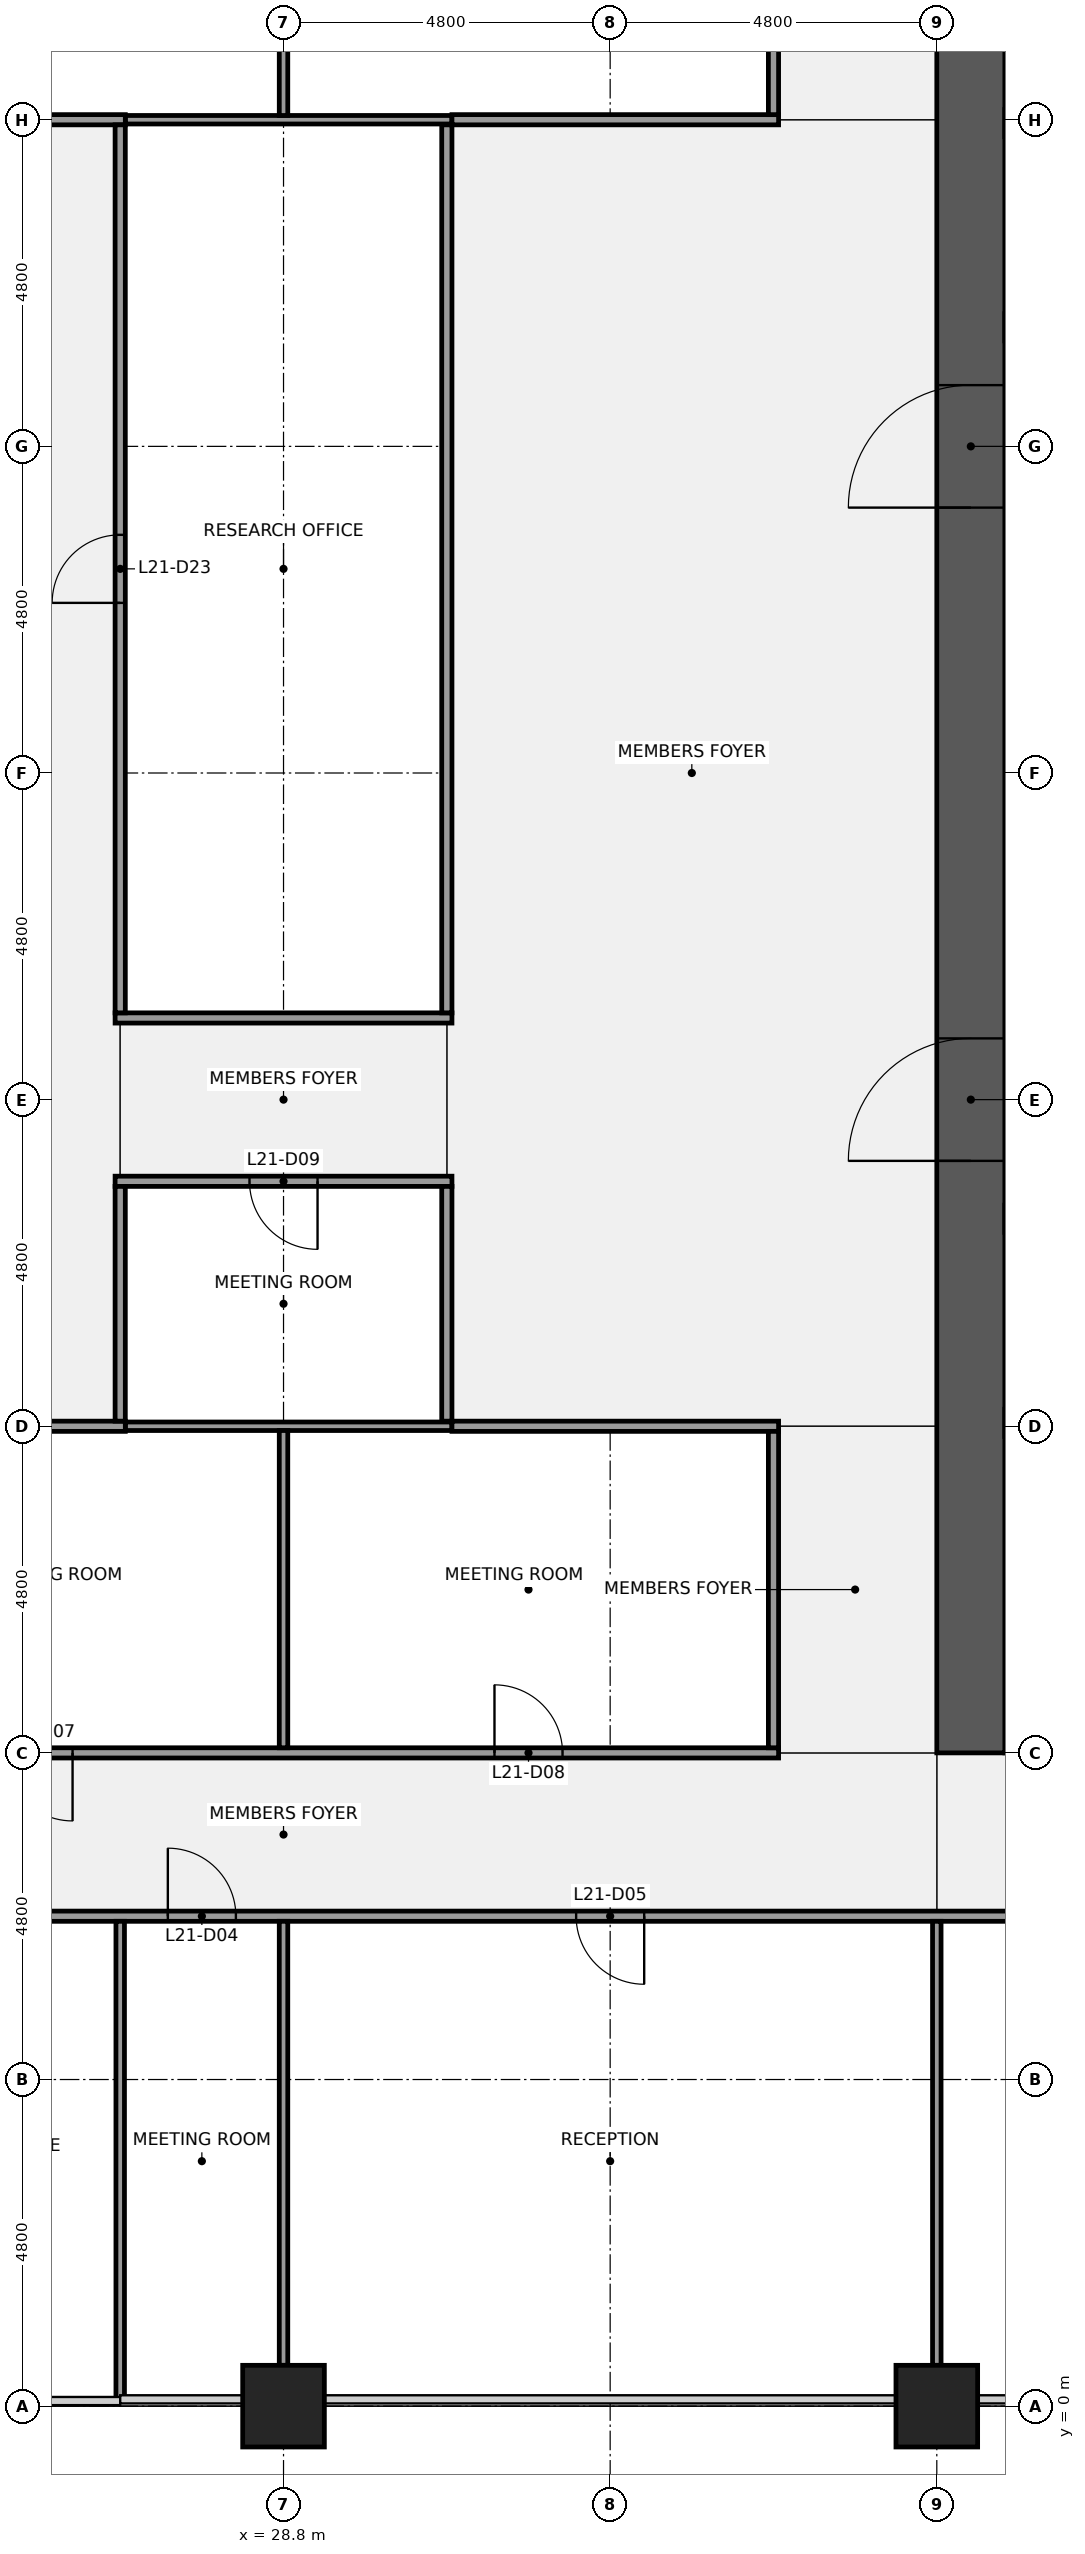
"""IFC4 building model, lengths in metres.
Left out: names, types, materials, properties, quantities, classifications, styles, units other than length and angle.
Written with IfcOpenShell. Run it as: python <this file> out.ifc"""

import sys

from ifc_helpers import new_model, si_unit, direction, frame, frame_2d, origin, origin_2d, place, context, subcontext, project, spatial, rectangle, extrude, element, fill, save


model = new_model("IFC4")
c1 = context("Model", 3, precision=1e-05, world=origin(), true_north=direction((0.0, 1.0)))
c2 = subcontext(c1, "Body", "Model", "MODEL_VIEW")
j1 = project(units=[si_unit("LENGTHUNIT", "METRE"), si_unit("PLANEANGLEUNIT", "RADIAN")], contexts=[c1])
p1 = place(None, origin())
s1 = spatial("IfcSite", under=j1, at=p1, CompositionType="ELEMENT")
p2 = place(p1, origin())
s2 = spatial("IfcBuilding", under=s1, at=p2, CompositionType="ELEMENT")
p3 = place(p2, frame((0.0, 0.0, 104.1)))
s3 = spatial("IfcBuildingStorey", under=s2, at=p3, CompositionType="ELEMENT", Elevation=104.1)
for number, where, z_axis, x_axis in (
    (1, (28.8, 0.0, 0.0), (0.0, 0.0, 1.0), (1.0, 0.0, 0.0)),
    (2, (38.4, 0.0, 0.0), (0.0, 0.0, 1.0), (1.0, 0.0, 0.0)),
):
    element("IfcColumn", number, at=place(p3, frame(where, z_axis=z_axis, x_axis=x_axis)), inside=s3, PredefinedType="COLUMN", context=c2, shape_type="SweptSolid", body=[
        extrude(rectangle(XDim=1.2, YDim=1.2, at=origin_2d()), origin(), (0.0, 0.0, 1.0), 4.0),
    ])
p4 = place(p3, frame((52.8, 10.1, 0.0), z_axis=(0.0, 0.0, 1.0), x_axis=(-1.0, 0.0, 0.0)))
e3 = element("IfcWall", 3, at=p4, inside=s3, PredefinedType="SHEAR", context=c2, shape_type="SweptSolid", body=[
    extrude(rectangle(XDim=13.4, YDim=1.0, at=frame_2d((6.7, 0.0))), origin(), (0.0, 0.0, 1.0), 3.84),
])
p5 = place(p4, frame((11.45, 0.0, 0.0)))
e4 = element("IfcOpeningElement", 4, at=p5, cuts=e3, PredefinedType="OPENING", context=c2, shape_type="SweptSolid", body=[
    extrude(rectangle(XDim=1.1, YDim=2.1, at=frame_2d((0.55, 1.05))), frame((0.0, 0.51, 0.0), z_axis=(0.0, -1.0, 0.0), x_axis=(1.0, 0.0, 0.0)), (0.0, 0.0, 1.0), 1.02),
])
p6 = place(p3, frame((38.9, 9.6, 0.0), z_axis=(0.0, 0.0, 1.0), x_axis=(0.0, 1.0, 0.0)))
e5 = element("IfcWall", 5, at=p6, inside=s3, PredefinedType="SHEAR", context=c2, shape_type="SweptSolid", body=[
    extrude(rectangle(XDim=28.8, YDim=1.0, at=frame_2d((14.4, 0.0))), origin(), (0.0, 0.0, 1.0), 3.84),
])
p7 = place(p6, frame((8.7, 0.0, 0.0)))
e6 = element("IfcOpeningElement", 6, at=p7, cuts=e5, PredefinedType="OPENING", context=c2, shape_type="SweptSolid", body=[
    extrude(rectangle(XDim=1.8, YDim=2.1, at=frame_2d((0.9, 1.05))), frame((0.0, 0.51, 0.0), z_axis=(0.0, -1.0, 0.0), x_axis=(1.0, 0.0, 0.0)), (0.0, 0.0, 1.0), 1.02),
])
p8 = place(p6, frame((18.3, 0.0, 0.0)))
e7 = element("IfcOpeningElement", 7, at=p8, cuts=e5, PredefinedType="OPENING", context=c2, shape_type="SweptSolid", body=[
    extrude(rectangle(XDim=1.8, YDim=2.1, at=frame_2d((0.9, 1.05))), frame((0.0, 0.51, 0.0), z_axis=(0.0, -1.0, 0.0), x_axis=(1.0, 0.0, 0.0)), (0.0, 0.0, 1.0), 1.02),
])
p9 = place(p3, frame((9.7, 7.2, 0.0), z_axis=(0.0, 0.0, 1.0), x_axis=(1.0, 0.0, 0.0)))
e8 = element("IfcWall", 8, at=p9, inside=s3, PredefinedType="PARTITIONING", context=c2, shape_type="SweptSolid", body=[
    extrude(rectangle(XDim=38.375, YDim=0.15, at=frame_2d((19.188, 0.0))), origin(), (0.0, 0.0, 1.0), 2.936),
])
p10 = place(p9, frame((4.25, 0.0, 0.0)))
e9 = element("IfcOpeningElement", 9, at=p10, cuts=e8, PredefinedType="OPENING", context=c2, shape_type="SweptSolid", body=[
    extrude(rectangle(XDim=1.0, YDim=2.1, at=frame_2d((0.5, 1.05))), frame((0.0, 0.085, 0.0), z_axis=(0.0, -1.0, 0.0), x_axis=(1.0, 0.0, 0.0)), (0.0, 0.0, 1.0), 0.17),
])
p11 = place(p9, frame((10.2, 0.0, 0.0)))
e10 = element("IfcOpeningElement", 10, at=p11, cuts=e8, PredefinedType="OPENING", context=c2, shape_type="SweptSolid", body=[
    extrude(rectangle(XDim=1.0, YDim=2.1, at=frame_2d((0.5, 1.05))), frame((0.0, 0.085, 0.0), z_axis=(0.0, -1.0, 0.0), x_axis=(1.0, 0.0, 0.0)), (0.0, 0.0, 1.0), 0.17),
])
p12 = place(p9, frame((13.8, 0.0, 0.0)))
e11 = element("IfcOpeningElement", 11, at=p12, cuts=e8, PredefinedType="OPENING", context=c2, shape_type="SweptSolid", body=[
    extrude(rectangle(XDim=1.0, YDim=2.1, at=frame_2d((0.5, 1.05))), frame((0.0, 0.085, 0.0), z_axis=(0.0, -1.0, 0.0), x_axis=(1.0, 0.0, 0.0)), (0.0, 0.0, 1.0), 0.17),
])
p13 = place(p9, frame((17.4, 0.0, 0.0)))
e12 = element("IfcOpeningElement", 12, at=p13, cuts=e8, PredefinedType="OPENING", context=c2, shape_type="SweptSolid", body=[
    extrude(rectangle(XDim=1.0, YDim=2.1, at=frame_2d((0.5, 1.05))), frame((0.0, 0.085, 0.0), z_axis=(0.0, -1.0, 0.0), x_axis=(1.0, 0.0, 0.0)), (0.0, 0.0, 1.0), 0.17),
])
p14 = place(p9, frame((23.4, 0.0, 0.0)))
e13 = element("IfcOpeningElement", 13, at=p14, cuts=e8, PredefinedType="OPENING", context=c2, shape_type="SweptSolid", body=[
    extrude(rectangle(XDim=1.0, YDim=2.1, at=frame_2d((0.5, 1.05))), frame((0.0, 0.085, 0.0), z_axis=(0.0, -1.0, 0.0), x_axis=(1.0, 0.0, 0.0)), (0.0, 0.0, 1.0), 0.17),
])
p15 = place(p9, frame((33.0, 0.0, 0.0)))
e14 = element("IfcOpeningElement", 14, at=p15, cuts=e8, PredefinedType="OPENING", context=c2, shape_type="SweptSolid", body=[
    extrude(rectangle(XDim=1.0, YDim=2.1, at=frame_2d((0.5, 1.05))), frame((0.0, 0.085, 0.0), z_axis=(0.0, -1.0, 0.0), x_axis=(1.0, 0.0, 0.0)), (0.0, 0.0, 1.0), 0.17),
])
p16 = place(p3, frame((21.525, 9.6, 0.0), z_axis=(0.0, 0.0, 1.0), x_axis=(1.0, 0.0, 0.0)))
e15 = element("IfcWall", 15, at=p16, inside=s3, PredefinedType="PARTITIONING", context=c2, shape_type="SweptSolid", body=[
    extrude(rectangle(XDim=14.55, YDim=0.15, at=frame_2d((7.275, 0.0))), origin(), (0.0, 0.0, 1.0), 2.936),
])
p17 = place(p16, frame((3.175, 0.0, 0.0)))
e16 = element("IfcOpeningElement", 16, at=p17, cuts=e15, PredefinedType="OPENING", context=c2, shape_type="SweptSolid", body=[
    extrude(rectangle(XDim=1.0, YDim=2.1, at=frame_2d((0.5, 1.05))), frame((0.0, 0.085, 0.0), z_axis=(0.0, -1.0, 0.0), x_axis=(1.0, 0.0, 0.0)), (0.0, 0.0, 1.0), 0.17),
])
p18 = place(p16, frame((10.375, 0.0, 0.0)))
e17 = element("IfcOpeningElement", 17, at=p18, cuts=e15, PredefinedType="OPENING", context=c2, shape_type="SweptSolid", body=[
    extrude(rectangle(XDim=1.0, YDim=2.1, at=frame_2d((0.5, 1.05))), frame((0.0, 0.085, 0.0), z_axis=(0.0, -1.0, 0.0), x_axis=(1.0, 0.0, 0.0)), (0.0, 0.0, 1.0), 0.17),
])
p19 = place(p3, frame((26.475, 14.4, 0.0), z_axis=(0.0, 0.0, 1.0), x_axis=(1.0, 0.0, 0.0)))
e18 = element("IfcWall", 18, at=p19, inside=s3, PredefinedType="PARTITIONING", context=c2, shape_type="SweptSolid", body=[
    extrude(rectangle(XDim=4.8, YDim=0.125, at=frame_2d((2.4, 0.0))), origin(), (0.0, 0.0, 1.0), 2.936),
])
p20 = place(p3, frame((21.525, 14.4, 0.0), z_axis=(0.0, 0.0, 1.0), x_axis=(1.0, 0.0, 0.0)))
e19 = element("IfcWall", 19, at=p20, inside=s3, PredefinedType="PARTITIONING", context=c2, shape_type="SweptSolid", body=[
    extrude(rectangle(XDim=4.95, YDim=0.15, at=frame_2d((2.475, 0.0))), origin(), (0.0, 0.0, 1.0), 2.936),
])
p21 = place(p3, frame((31.275, 14.4, 0.0), z_axis=(0.0, 0.0, 1.0), x_axis=(1.0, 0.0, 0.0)))
e20 = element("IfcWall", 20, at=p21, inside=s3, PredefinedType="PARTITIONING", context=c2, shape_type="SweptSolid", body=[
    extrude(rectangle(XDim=4.8, YDim=0.15, at=frame_2d((2.4, 0.0))), origin(), (0.0, 0.0, 1.0), 2.936),
])
p22 = place(p3, frame((26.325, 18.0, 0.0), z_axis=(0.0, 0.0, 1.0), x_axis=(1.0, 0.0, 0.0)))
e21 = element("IfcWall", 21, at=p22, inside=s3, PredefinedType="PARTITIONING", context=c2, shape_type="SweptSolid", body=[
    extrude(rectangle(XDim=4.95, YDim=0.15, at=frame_2d((2.475, 0.0))), origin(), (0.0, 0.0, 1.0), 2.936),
])
p23 = place(p22, frame((1.975, 0.0, 0.0)))
e22 = element("IfcOpeningElement", 22, at=p23, cuts=e21, PredefinedType="OPENING", context=c2, shape_type="SweptSolid", body=[
    extrude(rectangle(XDim=1.0, YDim=2.1, at=frame_2d((0.5, 1.05))), frame((0.0, 0.085, 0.0), z_axis=(0.0, -1.0, 0.0), x_axis=(1.0, 0.0, 0.0)), (0.0, 0.0, 1.0), 0.17),
])
p24 = place(p3, frame((26.325, 20.4, 0.0), z_axis=(0.0, 0.0, 1.0), x_axis=(1.0, 0.0, 0.0)))
e23 = element("IfcWall", 23, at=p24, inside=s3, PredefinedType="PARTITIONING", context=c2, shape_type="SweptSolid", body=[
    extrude(rectangle(XDim=4.95, YDim=0.15, at=frame_2d((2.475, 0.0))), origin(), (0.0, 0.0, 1.0), 2.936),
])
p25 = place(p3, frame((26.475, 33.6, 0.0), z_axis=(0.0, 0.0, 1.0), x_axis=(1.0, 0.0, 0.0)))
e24 = element("IfcWall", 24, at=p25, inside=s3, PredefinedType="PARTITIONING", context=c2, shape_type="SweptSolid", body=[
    extrude(rectangle(XDim=4.8, YDim=0.125, at=frame_2d((2.4, 0.0))), origin(), (0.0, 0.0, 1.0), 2.936),
])
p26 = place(p3, frame((21.525, 33.6, 0.0), z_axis=(0.0, 0.0, 1.0), x_axis=(1.0, 0.0, 0.0)))
e25 = element("IfcWall", 25, at=p26, inside=s3, PredefinedType="PARTITIONING", context=c2, shape_type="SweptSolid", body=[
    extrude(rectangle(XDim=4.95, YDim=0.15, at=frame_2d((2.475, 0.0))), origin(), (0.0, 0.0, 1.0), 2.936),
])
p27 = place(p3, frame((31.275, 33.6, 0.0), z_axis=(0.0, 0.0, 1.0), x_axis=(1.0, 0.0, 0.0)))
e26 = element("IfcWall", 26, at=p27, inside=s3, PredefinedType="PARTITIONING", context=c2, shape_type="SweptSolid", body=[
    extrude(rectangle(XDim=4.8, YDim=0.15, at=frame_2d((2.4, 0.0))), origin(), (0.0, 0.0, 1.0), 2.936),
])
p28 = place(p3, frame((26.4, 0.1, 0.0), z_axis=(0.0, 0.0, 1.0), x_axis=(0.0, 1.0, 0.0)))
e27 = element("IfcWall", 27, at=p28, inside=s3, PredefinedType="PARTITIONING", context=c2, shape_type="SweptSolid", body=[
    extrude(rectangle(XDim=7.025, YDim=0.125, at=frame_2d((3.512, 0.0))), origin(), (0.0, 0.0, 1.0), 2.936),
])
p29 = place(p3, frame((26.4, 14.475, 0.0), z_axis=(0.0, 0.0, 1.0), x_axis=(0.0, 1.0, 0.0)))
e28 = element("IfcWall", 28, at=p29, inside=s3, PredefinedType="PARTITIONING", context=c2, shape_type="SweptSolid", body=[
    extrude(rectangle(XDim=3.45, YDim=0.15, at=frame_2d((1.725, 0.0))), origin(), (0.0, 0.0, 1.0), 2.936),
])
p30 = place(p3, frame((26.4, 20.475, 0.0), z_axis=(0.0, 0.0, 1.0), x_axis=(0.0, 1.0, 0.0)))
e29 = element("IfcWall", 29, at=p30, inside=s3, PredefinedType="PARTITIONING", context=c2, shape_type="SweptSolid", body=[
    extrude(rectangle(XDim=13.05, YDim=0.15, at=frame_2d((6.525, 0.0))), origin(), (0.0, 0.0, 1.0), 2.936),
])
p31 = place(p30, frame((6.025, 0.0, 0.0)))
e30 = element("IfcOpeningElement", 30, at=p31, cuts=e29, PredefinedType="OPENING", context=c2, shape_type="SweptSolid", body=[
    extrude(rectangle(XDim=1.0, YDim=2.1, at=frame_2d((0.5, 1.05))), frame((0.0, 0.085, 0.0), z_axis=(0.0, -1.0, 0.0), x_axis=(1.0, 0.0, 0.0)), (0.0, 0.0, 1.0), 0.17),
])
p32 = place(p3, frame((28.8, 0.6, 0.0), z_axis=(0.0, 0.0, 1.0), x_axis=(0.0, 1.0, 0.0)))
e31 = element("IfcWall", 31, at=p32, inside=s3, PredefinedType="PARTITIONING", context=c2, shape_type="SweptSolid", body=[
    extrude(rectangle(XDim=6.525, YDim=0.125, at=frame_2d((3.262, 0.0))), origin(), (0.0, 0.0, 1.0), 2.936),
])
for number, where, z_axis, x_axis in (
    (32, (28.8, 9.675, 0.0), (0.0, 0.0, 1.0), (0.0, 1.0, 0.0)),
    (33, (28.8, 33.663, 0.0), (0.0, 0.0, 1.0), (0.0, 1.0, 0.0)),
):
    element("IfcWall", number, at=place(p3, frame(where, z_axis=z_axis, x_axis=x_axis)), inside=s3, PredefinedType="PARTITIONING", context=c2, shape_type="SweptSolid", body=[
        extrude(rectangle(XDim=4.662, YDim=0.125, at=frame_2d((2.331, 0.0))), origin(), (0.0, 0.0, 1.0), 2.936),
    ])
p33 = place(p3, frame((31.2, 14.475, 0.0), z_axis=(0.0, 0.0, 1.0), x_axis=(0.0, 1.0, 0.0)))
e34 = element("IfcWall", 34, at=p33, inside=s3, PredefinedType="PARTITIONING", context=c2, shape_type="SweptSolid", body=[
    extrude(rectangle(XDim=3.45, YDim=0.15, at=frame_2d((1.725, 0.0))), origin(), (0.0, 0.0, 1.0), 2.936),
])
p34 = place(p3, frame((31.2, 20.475, 0.0), z_axis=(0.0, 0.0, 1.0), x_axis=(0.0, 1.0, 0.0)))
e35 = element("IfcWall", 35, at=p34, inside=s3, PredefinedType="PARTITIONING", context=c2, shape_type="SweptSolid", body=[
    extrude(rectangle(XDim=13.05, YDim=0.15, at=frame_2d((6.525, 0.0))), origin(), (0.0, 0.0, 1.0), 2.936),
])
for number, where, z_axis, x_axis in (
    (36, (36.0, 9.675, 0.0), (0.0, 0.0, 1.0), (0.0, 1.0, 0.0)),
    (37, (36.0, 33.675, 0.0), (0.0, 0.0, 1.0), (0.0, 1.0, 0.0)),
):
    element("IfcWall", number, at=place(p3, frame(where, z_axis=z_axis, x_axis=x_axis)), inside=s3, PredefinedType="PARTITIONING", context=c2, shape_type="SweptSolid", body=[
        extrude(rectangle(XDim=4.65, YDim=0.15, at=frame_2d((2.325, 0.0))), origin(), (0.0, 0.0, 1.0), 2.936),
    ])
p35 = place(p3, frame((38.4, 0.6, 0.0), z_axis=(0.0, 0.0, 1.0), x_axis=(0.0, 1.0, 0.0)))
e38 = element("IfcWall", 38, at=p35, inside=s3, PredefinedType="PARTITIONING", context=c2, shape_type="SweptSolid", body=[
    extrude(rectangle(XDim=6.525, YDim=0.125, at=frame_2d((3.262, 0.0))), origin(), (0.0, 0.0, 1.0), 2.936),
])
p36 = place(p3, frame((38.4, -1.05, 0.0), z_axis=(0.0, 0.0, 1.0), x_axis=(1.0, 0.0, 0.0)))
e39 = element("IfcColumn", 39, at=p36, inside=s3, PredefinedType="PILASTER", context=c2, shape_type="SweptSolid", body=[
    extrude(rectangle(XDim=3.6, YDim=0.9, at=origin_2d()), origin(), (0.0, 0.0, 1.0), 4.0),
])
p37 = place(p7, origin())
e40 = element("IfcDoor", 40, at=p37, inside=s3, OperationType="DOUBLE_DOOR_SINGLE_SWING", PredefinedType="DOOR", context=c2, shape_type="SweptSolid", body=[
    extrude(rectangle(XDim=1.8, YDim=2.1, at=frame_2d((0.9, 1.05))), frame((0.0, 0.025, 0.0), z_axis=(0.0, -1.0, 0.0), x_axis=(1.0, 0.0, 0.0)), (0.0, 0.0, 1.0), 0.05),
])
fill(e6, e40)
p38 = place(p8, origin())
e41 = element("IfcDoor", 41, at=p38, inside=s3, OperationType="DOUBLE_DOOR_SINGLE_SWING", PredefinedType="DOOR", context=c2, shape_type="SweptSolid", body=[
    extrude(rectangle(XDim=1.8, YDim=2.1, at=frame_2d((0.9, 1.05))), frame((0.0, 0.025, 0.0), z_axis=(0.0, -1.0, 0.0), x_axis=(1.0, 0.0, 0.0)), (0.0, 0.0, 1.0), 0.05),
])
fill(e7, e41)
p39 = place(p13, origin())
e42 = element("IfcDoor", 42, at=p39, inside=s3, OperationType="SINGLE_SWING_LEFT", PredefinedType="DOOR", context=c2, shape_type="SweptSolid", body=[
    extrude(rectangle(XDim=1.0, YDim=2.1, at=frame_2d((0.5, 1.05))), frame((0.0, 0.025, 0.0), z_axis=(0.0, -1.0, 0.0), x_axis=(1.0, 0.0, 0.0)), (0.0, 0.0, 1.0), 0.05),
])
fill(e12, e42)
p40 = place(p14, origin())
e43 = element("IfcDoor", 43, at=p40, inside=s3, OperationType="SINGLE_SWING_RIGHT", PredefinedType="DOOR", context=c2, shape_type="SweptSolid", body=[
    extrude(rectangle(XDim=1.0, YDim=2.1, at=frame_2d((0.5, 1.05))), frame((0.0, 0.025, 0.0), z_axis=(0.0, -1.0, 0.0), x_axis=(1.0, 0.0, 0.0)), (0.0, 0.0, 1.0), 0.05),
])
fill(e13, e43)
p41 = place(p17, origin())
e44 = element("IfcDoor", 44, at=p41, inside=s3, OperationType="SINGLE_SWING_RIGHT", PredefinedType="DOOR", context=c2, shape_type="SweptSolid", body=[
    extrude(rectangle(XDim=1.0, YDim=2.1, at=frame_2d((0.5, 1.05))), frame((0.0, 0.025, 0.0), z_axis=(0.0, -1.0, 0.0), x_axis=(1.0, 0.0, 0.0)), (0.0, 0.0, 1.0), 0.05),
])
fill(e16, e44)
p42 = place(p18, origin())
e45 = element("IfcDoor", 45, at=p42, inside=s3, OperationType="SINGLE_SWING_LEFT", PredefinedType="DOOR", context=c2, shape_type="SweptSolid", body=[
    extrude(rectangle(XDim=1.0, YDim=2.1, at=frame_2d((0.5, 1.05))), frame((0.0, 0.025, 0.0), z_axis=(0.0, -1.0, 0.0), x_axis=(1.0, 0.0, 0.0)), (0.0, 0.0, 1.0), 0.05),
])
fill(e17, e45)
p43 = place(p23, origin())
e46 = element("IfcDoor", 46, at=p43, inside=s3, OperationType="SINGLE_SWING_RIGHT", PredefinedType="DOOR", context=c2, shape_type="SweptSolid", body=[
    extrude(rectangle(XDim=1.0, YDim=2.1, at=frame_2d((0.5, 1.05))), frame((0.0, 0.025, 0.0), z_axis=(0.0, -1.0, 0.0), x_axis=(1.0, 0.0, 0.0)), (0.0, 0.0, 1.0), 0.05),
])
fill(e22, e46)
p44 = place(p31, origin())
e47 = element("IfcDoor", 47, at=p44, inside=s3, OperationType="SINGLE_SWING_LEFT", PredefinedType="DOOR", context=c2, shape_type="SweptSolid", body=[
    extrude(rectangle(XDim=1.0, YDim=2.1, at=frame_2d((0.5, 1.05))), frame((0.0, 0.025, 0.0), z_axis=(0.0, -1.0, 0.0), x_axis=(1.0, 0.0, 0.0)), (0.0, 0.0, 1.0), 0.05),
])
fill(e30, e47)
save(model, sys.argv[1])
